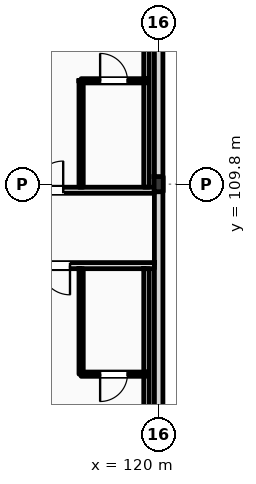
"""IFC4 building model, lengths in metres.
Left out: names, types, materials, properties, quantities, classifications, styles, units other than length and angle.
Written with IfcOpenShell. Run it as: python <this file> out.ifc"""

import sys

from ifc_helpers import new_model, si_unit, direction, frame, frame_2d, origin, origin_2d, place, context, subcontext, project, spatial, rectangle, i_section, extrude, element, fill, save


model = new_model("IFC4")
c1 = context("Model", 3, precision=1e-05, world=origin(), true_north=direction((0.0, 1.0)))
c2 = subcontext(c1, "Body", "Model", "MODEL_VIEW")
j1 = project(units=[si_unit("LENGTHUNIT", "METRE"), si_unit("PLANEANGLEUNIT", "RADIAN")], contexts=[c1])
p1 = place(None, origin())
s1 = spatial("IfcSite", under=j1, at=p1, CompositionType="ELEMENT")
p2 = place(p1, origin())
s2 = spatial("IfcBuilding", under=s1, at=p2, CompositionType="ELEMENT")
p3 = place(p2, frame((0.0, 0.0, 24.6)))
s3 = spatial("IfcBuildingStorey", under=s2, at=p3, CompositionType="ELEMENT", Elevation=24.6)
p4 = place(p3, frame((120.0, 109.8, 0.0), z_axis=(0.0, 0.0, 1.0), x_axis=(1.0, 0.0, 0.0)))
e1 = element("IfcColumn", 1, at=p4, inside=s3, PredefinedType="COLUMN", context=c2, shape_type="SweptSolid", body=[
    extrude(i_section(OverallWidth=0.3, OverallDepth=0.5, WebThickness=0.014, FlangeThickness=0.028, FilletRadius=0.027, at=origin_2d()), origin(), (0.0, 0.0, 1.0), 3.6),
])
p5 = place(p3, frame((120.0, 96.0, 0.0), z_axis=(0.0, 0.0, 1.0), x_axis=(0.0, 1.0, 0.0)))
e2 = element("IfcWall", 2, at=p5, inside=s3, PredefinedType="STANDARD", context=c2, shape_type="SweptSolid", body=[
    extrude(rectangle(XDim=22.0, YDim=0.28, at=frame_2d((11.0, 0.0))), origin(), (0.0, 0.0, 1.0), 2.93),
])
p6 = place(p3, frame((10.65, 109.6, 0.0), z_axis=(0.0, 0.0, 1.0), x_axis=(1.0, 0.0, 0.0)))
e3 = element("IfcWall", 3, at=p6, inside=s3, PredefinedType="PARTITIONING", context=c2, shape_type="SweptSolid", body=[
    extrude(rectangle(XDim=109.21, YDim=0.2, at=frame_2d((54.605, 0.0))), origin(), (0.0, 0.0, 1.0), 2.78),
])
p7 = place(p6, frame((12.705, 0.0, 0.0)))
e4 = element("IfcOpeningElement", 4, at=p7, cuts=e3, PredefinedType="OPENING", context=c2, shape_type="SweptSolid", body=[
    extrude(rectangle(XDim=1.02, YDim=2.2, at=frame_2d((0.51, 1.1))), frame((0.0, 0.11, 0.0), z_axis=(0.0, -1.0, 0.0), x_axis=(1.0, 0.0, 0.0)), (0.0, 0.0, 1.0), 0.22),
])
p8 = place(p6, frame((19.26, 0.0, 0.0)))
e5 = element("IfcOpeningElement", 5, at=p8, cuts=e3, PredefinedType="OPENING", context=c2, shape_type="SweptSolid", body=[
    extrude(rectangle(XDim=1.02, YDim=2.2, at=frame_2d((0.51, 1.1))), frame((0.0, 0.11, 0.0), z_axis=(0.0, -1.0, 0.0), x_axis=(1.0, 0.0, 0.0)), (0.0, 0.0, 1.0), 0.22),
])
p9 = place(p6, frame((23.71, 0.0, 0.0)))
e6 = element("IfcOpeningElement", 6, at=p9, cuts=e3, PredefinedType="OPENING", context=c2, shape_type="SweptSolid", body=[
    extrude(rectangle(XDim=1.02, YDim=2.2, at=frame_2d((0.51, 1.1))), frame((0.0, 0.11, 0.0), z_axis=(0.0, -1.0, 0.0), x_axis=(1.0, 0.0, 0.0)), (0.0, 0.0, 1.0), 0.22),
])
p10 = place(p6, frame((27.66, 0.0, 0.0)))
e7 = element("IfcOpeningElement", 7, at=p10, cuts=e3, PredefinedType="OPENING", context=c2, shape_type="SweptSolid", body=[
    extrude(rectangle(XDim=1.02, YDim=2.2, at=frame_2d((0.51, 1.1))), frame((0.0, 0.11, 0.0), z_axis=(0.0, -1.0, 0.0), x_axis=(1.0, 0.0, 0.0)), (0.0, 0.0, 1.0), 0.22),
])
p11 = place(p6, frame((31.89, 0.0, 0.0)))
e8 = element("IfcOpeningElement", 8, at=p11, cuts=e3, PredefinedType="OPENING", context=c2, shape_type="SweptSolid", body=[
    extrude(rectangle(XDim=0.96, YDim=2.2, at=frame_2d((0.48, 1.1))), frame((0.0, 0.11, 0.0), z_axis=(0.0, -1.0, 0.0), x_axis=(1.0, 0.0, 0.0)), (0.0, 0.0, 1.0), 0.22),
])
p12 = place(p6, frame((33.94, 0.0, 0.0)))
e9 = element("IfcOpeningElement", 9, at=p12, cuts=e3, PredefinedType="OPENING", context=c2, shape_type="SweptSolid", body=[
    extrude(rectangle(XDim=0.96, YDim=2.2, at=frame_2d((0.48, 1.1))), frame((0.0, 0.11, 0.0), z_axis=(0.0, -1.0, 0.0), x_axis=(1.0, 0.0, 0.0)), (0.0, 0.0, 1.0), 0.22),
])
p13 = place(p6, frame((40.29, 0.0, 0.0)))
e10 = element("IfcOpeningElement", 10, at=p13, cuts=e3, PredefinedType="OPENING", context=c2, shape_type="SweptSolid", body=[
    extrude(rectangle(XDim=0.96, YDim=2.2, at=frame_2d((0.48, 1.1))), frame((0.0, 0.11, 0.0), z_axis=(0.0, -1.0, 0.0), x_axis=(1.0, 0.0, 0.0)), (0.0, 0.0, 1.0), 0.22),
])
p14 = place(p6, frame((42.34, 0.0, 0.0)))
e11 = element("IfcOpeningElement", 11, at=p14, cuts=e3, PredefinedType="OPENING", context=c2, shape_type="SweptSolid", body=[
    extrude(rectangle(XDim=0.96, YDim=2.2, at=frame_2d((0.48, 1.1))), frame((0.0, 0.11, 0.0), z_axis=(0.0, -1.0, 0.0), x_axis=(1.0, 0.0, 0.0)), (0.0, 0.0, 1.0), 0.22),
])
p15 = place(p6, frame((48.69, 0.0, 0.0)))
e12 = element("IfcOpeningElement", 12, at=p15, cuts=e3, PredefinedType="OPENING", context=c2, shape_type="SweptSolid", body=[
    extrude(rectangle(XDim=0.96, YDim=2.2, at=frame_2d((0.48, 1.1))), frame((0.0, 0.11, 0.0), z_axis=(0.0, -1.0, 0.0), x_axis=(1.0, 0.0, 0.0)), (0.0, 0.0, 1.0), 0.22),
])
p16 = place(p6, frame((50.74, 0.0, 0.0)))
e13 = element("IfcOpeningElement", 13, at=p16, cuts=e3, PredefinedType="OPENING", context=c2, shape_type="SweptSolid", body=[
    extrude(rectangle(XDim=0.96, YDim=2.2, at=frame_2d((0.48, 1.1))), frame((0.0, 0.11, 0.0), z_axis=(0.0, -1.0, 0.0), x_axis=(1.0, 0.0, 0.0)), (0.0, 0.0, 1.0), 0.22),
])
p17 = place(p6, frame((57.09, 0.0, 0.0)))
e14 = element("IfcOpeningElement", 14, at=p17, cuts=e3, PredefinedType="OPENING", context=c2, shape_type="SweptSolid", body=[
    extrude(rectangle(XDim=0.96, YDim=2.2, at=frame_2d((0.48, 1.1))), frame((0.0, 0.11, 0.0), z_axis=(0.0, -1.0, 0.0), x_axis=(1.0, 0.0, 0.0)), (0.0, 0.0, 1.0), 0.22),
])
p18 = place(p6, frame((59.14, 0.0, 0.0)))
e15 = element("IfcOpeningElement", 15, at=p18, cuts=e3, PredefinedType="OPENING", context=c2, shape_type="SweptSolid", body=[
    extrude(rectangle(XDim=0.96, YDim=2.2, at=frame_2d((0.48, 1.1))), frame((0.0, 0.11, 0.0), z_axis=(0.0, -1.0, 0.0), x_axis=(1.0, 0.0, 0.0)), (0.0, 0.0, 1.0), 0.22),
])
p19 = place(p6, frame((65.49, 0.0, 0.0)))
e16 = element("IfcOpeningElement", 16, at=p19, cuts=e3, PredefinedType="OPENING", context=c2, shape_type="SweptSolid", body=[
    extrude(rectangle(XDim=0.96, YDim=2.2, at=frame_2d((0.48, 1.1))), frame((0.0, 0.11, 0.0), z_axis=(0.0, -1.0, 0.0), x_axis=(1.0, 0.0, 0.0)), (0.0, 0.0, 1.0), 0.22),
])
p20 = place(p6, frame((67.54, 0.0, 0.0)))
e17 = element("IfcOpeningElement", 17, at=p20, cuts=e3, PredefinedType="OPENING", context=c2, shape_type="SweptSolid", body=[
    extrude(rectangle(XDim=0.96, YDim=2.2, at=frame_2d((0.48, 1.1))), frame((0.0, 0.11, 0.0), z_axis=(0.0, -1.0, 0.0), x_axis=(1.0, 0.0, 0.0)), (0.0, 0.0, 1.0), 0.22),
])
p21 = place(p6, frame((73.89, 0.0, 0.0)))
e18 = element("IfcOpeningElement", 18, at=p21, cuts=e3, PredefinedType="OPENING", context=c2, shape_type="SweptSolid", body=[
    extrude(rectangle(XDim=0.96, YDim=2.2, at=frame_2d((0.48, 1.1))), frame((0.0, 0.11, 0.0), z_axis=(0.0, -1.0, 0.0), x_axis=(1.0, 0.0, 0.0)), (0.0, 0.0, 1.0), 0.22),
])
p22 = place(p6, frame((78.09, 0.0, 0.0)))
e19 = element("IfcOpeningElement", 19, at=p22, cuts=e3, PredefinedType="OPENING", context=c2, shape_type="SweptSolid", body=[
    extrude(rectangle(XDim=0.96, YDim=2.2, at=frame_2d((0.48, 1.1))), frame((0.0, 0.11, 0.0), z_axis=(0.0, -1.0, 0.0), x_axis=(1.0, 0.0, 0.0)), (0.0, 0.0, 1.0), 0.22),
])
p23 = place(p6, frame((82.29, 0.0, 0.0)))
e20 = element("IfcOpeningElement", 20, at=p23, cuts=e3, PredefinedType="OPENING", context=c2, shape_type="SweptSolid", body=[
    extrude(rectangle(XDim=0.96, YDim=2.2, at=frame_2d((0.48, 1.1))), frame((0.0, 0.11, 0.0), z_axis=(0.0, -1.0, 0.0), x_axis=(1.0, 0.0, 0.0)), (0.0, 0.0, 1.0), 0.22),
])
p24 = place(p6, frame((86.49, 0.0, 0.0)))
e21 = element("IfcOpeningElement", 21, at=p24, cuts=e3, PredefinedType="OPENING", context=c2, shape_type="SweptSolid", body=[
    extrude(rectangle(XDim=0.96, YDim=2.2, at=frame_2d((0.48, 1.1))), frame((0.0, 0.11, 0.0), z_axis=(0.0, -1.0, 0.0), x_axis=(1.0, 0.0, 0.0)), (0.0, 0.0, 1.0), 0.22),
])
p25 = place(p6, frame((88.54, 0.0, 0.0)))
e22 = element("IfcOpeningElement", 22, at=p25, cuts=e3, PredefinedType="OPENING", context=c2, shape_type="SweptSolid", body=[
    extrude(rectangle(XDim=0.96, YDim=2.2, at=frame_2d((0.48, 1.1))), frame((0.0, 0.11, 0.0), z_axis=(0.0, -1.0, 0.0), x_axis=(1.0, 0.0, 0.0)), (0.0, 0.0, 1.0), 0.22),
])
p26 = place(p6, frame((94.89, 0.0, 0.0)))
e23 = element("IfcOpeningElement", 23, at=p26, cuts=e3, PredefinedType="OPENING", context=c2, shape_type="SweptSolid", body=[
    extrude(rectangle(XDim=0.96, YDim=2.2, at=frame_2d((0.48, 1.1))), frame((0.0, 0.11, 0.0), z_axis=(0.0, -1.0, 0.0), x_axis=(1.0, 0.0, 0.0)), (0.0, 0.0, 1.0), 0.22),
])
p27 = place(p6, frame((96.94, 0.0, 0.0)))
e24 = element("IfcOpeningElement", 24, at=p27, cuts=e3, PredefinedType="OPENING", context=c2, shape_type="SweptSolid", body=[
    extrude(rectangle(XDim=0.96, YDim=2.2, at=frame_2d((0.48, 1.1))), frame((0.0, 0.11, 0.0), z_axis=(0.0, -1.0, 0.0), x_axis=(1.0, 0.0, 0.0)), (0.0, 0.0, 1.0), 0.22),
])
p28 = place(p6, frame((103.29, 0.0, 0.0)))
e25 = element("IfcOpeningElement", 25, at=p28, cuts=e3, PredefinedType="OPENING", context=c2, shape_type="SweptSolid", body=[
    extrude(rectangle(XDim=0.96, YDim=2.2, at=frame_2d((0.48, 1.1))), frame((0.0, 0.11, 0.0), z_axis=(0.0, -1.0, 0.0), x_axis=(1.0, 0.0, 0.0)), (0.0, 0.0, 1.0), 0.22),
])
p29 = place(p6, frame((105.25, 0.0, 0.0)))
e26 = element("IfcOpeningElement", 26, at=p29, cuts=e3, PredefinedType="OPENING", context=c2, shape_type="SweptSolid", body=[
    extrude(rectangle(XDim=0.96, YDim=2.2, at=frame_2d((0.48, 1.1))), frame((0.0, 0.11, 0.0), z_axis=(0.0, -1.0, 0.0), x_axis=(1.0, 0.0, 0.0)), (0.0, 0.0, 1.0), 0.22),
])
p30 = place(p6, frame((2.716, 0.0, 0.0)))
e27 = element("IfcOpeningElement", 27, at=p30, cuts=e3, PredefinedType="OPENING", context=c2, shape_type="SweptSolid", body=[
    extrude(rectangle(XDim=1.35, YDim=2.25, at=frame_2d((0.675, 1.125))), frame((0.0, 0.11, 0.0), z_axis=(0.0, -1.0, 0.0), x_axis=(1.0, 0.0, 0.0)), (0.0, 0.0, 1.0), 0.22),
])
p31 = place(p6, frame((6.65, 0.0, 0.0)))
e28 = element("IfcOpeningElement", 28, at=p31, cuts=e3, PredefinedType="OPENING", context=c2, shape_type="SweptSolid", body=[
    extrude(rectangle(XDim=1.35, YDim=2.25, at=frame_2d((0.675, 1.125))), frame((0.0, 0.11, 0.0), z_axis=(0.0, -1.0, 0.0), x_axis=(1.0, 0.0, 0.0)), (0.0, 0.0, 1.0), 0.22),
])
p32 = place(p6, frame((10.583, 0.0, 0.0)))
e29 = element("IfcOpeningElement", 29, at=p32, cuts=e3, PredefinedType="OPENING", context=c2, shape_type="SweptSolid", body=[
    extrude(rectangle(XDim=1.35, YDim=2.25, at=frame_2d((0.675, 1.125))), frame((0.0, 0.11, 0.0), z_axis=(0.0, -1.0, 0.0), x_axis=(1.0, 0.0, 0.0)), (0.0, 0.0, 1.0), 0.22),
])
p33 = place(p3, frame((79.76, 107.12, 0.0), z_axis=(0.0, 0.0, 1.0), x_axis=(1.0, 0.0, 0.0)))
e30 = element("IfcWall", 30, at=p33, inside=s3, PredefinedType="PARTITIONING", context=c2, shape_type="SweptSolid", body=[
    extrude(rectangle(XDim=40.1, YDim=0.2, at=frame_2d((20.05, 0.0))), origin(), (0.0, 0.0, 1.0), 3.34),
])
p34 = place(p33, frame((2.65, 0.0, 0.0)))
e31 = element("IfcOpeningElement", 31, at=p34, cuts=e30, PredefinedType="OPENING", context=c2, shape_type="SweptSolid", body=[
    extrude(rectangle(XDim=0.96, YDim=2.2, at=frame_2d((0.48, 1.1))), frame((0.0, 0.11, 0.0), z_axis=(0.0, -1.0, 0.0), x_axis=(1.0, 0.0, 0.0)), (0.0, 0.0, 1.0), 0.22),
])
p35 = place(p33, frame((4.448, 0.0, 0.0)))
e32 = element("IfcOpeningElement", 32, at=p35, cuts=e30, PredefinedType="OPENING", context=c2, shape_type="SweptSolid", body=[
    extrude(rectangle(XDim=0.96, YDim=2.2, at=frame_2d((0.48, 1.1))), frame((0.0, 0.11, 0.0), z_axis=(0.0, -1.0, 0.0), x_axis=(1.0, 0.0, 0.0)), (0.0, 0.0, 1.0), 0.22),
])
p36 = place(p33, frame((10.583, 0.0, 0.0)))
e33 = element("IfcOpeningElement", 33, at=p36, cuts=e30, PredefinedType="OPENING", context=c2, shape_type="SweptSolid", body=[
    extrude(rectangle(XDim=0.96, YDim=2.2, at=frame_2d((0.48, 1.1))), frame((0.0, 0.11, 0.0), z_axis=(0.0, -1.0, 0.0), x_axis=(1.0, 0.0, 0.0)), (0.0, 0.0, 1.0), 0.22),
])
p37 = place(p33, frame((12.418, 0.0, 0.0)))
e34 = element("IfcOpeningElement", 34, at=p37, cuts=e30, PredefinedType="OPENING", context=c2, shape_type="SweptSolid", body=[
    extrude(rectangle(XDim=0.96, YDim=2.2, at=frame_2d((0.48, 1.1))), frame((0.0, 0.11, 0.0), z_axis=(0.0, -1.0, 0.0), x_axis=(1.0, 0.0, 0.0)), (0.0, 0.0, 1.0), 0.22),
])
p38 = place(p33, frame((18.553, 0.0, 0.0)))
e35 = element("IfcOpeningElement", 35, at=p38, cuts=e30, PredefinedType="OPENING", context=c2, shape_type="SweptSolid", body=[
    extrude(rectangle(XDim=0.96, YDim=2.2, at=frame_2d((0.48, 1.1))), frame((0.0, 0.11, 0.0), z_axis=(0.0, -1.0, 0.0), x_axis=(1.0, 0.0, 0.0)), (0.0, 0.0, 1.0), 0.22),
])
p39 = place(p33, frame((20.388, 0.0, 0.0)))
e36 = element("IfcOpeningElement", 36, at=p39, cuts=e30, PredefinedType="OPENING", context=c2, shape_type="SweptSolid", body=[
    extrude(rectangle(XDim=0.96, YDim=2.2, at=frame_2d((0.48, 1.1))), frame((0.0, 0.11, 0.0), z_axis=(0.0, -1.0, 0.0), x_axis=(1.0, 0.0, 0.0)), (0.0, 0.0, 1.0), 0.22),
])
p40 = place(p33, frame((26.523, 0.0, 0.0)))
e37 = element("IfcOpeningElement", 37, at=p40, cuts=e30, PredefinedType="OPENING", context=c2, shape_type="SweptSolid", body=[
    extrude(rectangle(XDim=0.96, YDim=2.2, at=frame_2d((0.48, 1.1))), frame((0.0, 0.11, 0.0), z_axis=(0.0, -1.0, 0.0), x_axis=(1.0, 0.0, 0.0)), (0.0, 0.0, 1.0), 0.22),
])
p41 = place(p33, frame((28.358, 0.0, 0.0)))
e38 = element("IfcOpeningElement", 38, at=p41, cuts=e30, PredefinedType="OPENING", context=c2, shape_type="SweptSolid", body=[
    extrude(rectangle(XDim=0.96, YDim=2.2, at=frame_2d((0.48, 1.1))), frame((0.0, 0.11, 0.0), z_axis=(0.0, -1.0, 0.0), x_axis=(1.0, 0.0, 0.0)), (0.0, 0.0, 1.0), 0.22),
])
p42 = place(p33, frame((34.493, 0.0, 0.0)))
e39 = element("IfcOpeningElement", 39, at=p42, cuts=e30, PredefinedType="OPENING", context=c2, shape_type="SweptSolid", body=[
    extrude(rectangle(XDim=0.96, YDim=2.2, at=frame_2d((0.48, 1.1))), frame((0.0, 0.11, 0.0), z_axis=(0.0, -1.0, 0.0), x_axis=(1.0, 0.0, 0.0)), (0.0, 0.0, 1.0), 0.22),
])
p43 = place(p33, frame((36.364, 0.0, 0.0)))
e40 = element("IfcOpeningElement", 40, at=p43, cuts=e30, PredefinedType="OPENING", context=c2, shape_type="SweptSolid", body=[
    extrude(rectangle(XDim=0.96, YDim=2.2, at=frame_2d((0.48, 1.1))), frame((0.0, 0.11, 0.0), z_axis=(0.0, -1.0, 0.0), x_axis=(1.0, 0.0, 0.0)), (0.0, 0.0, 1.0), 0.22),
])
p44 = place(p3, frame((119.6, 109.7, 0.0), z_axis=(0.0, 0.0, 1.0), x_axis=(0.0, 1.0, 0.0)))
e41 = element("IfcWall", 41, at=p44, inside=s3, PredefinedType="PARTITIONING", context=c2, shape_type="SweptSolid", body=[
    extrude(rectangle(XDim=8.15, YDim=0.18, at=frame_2d((4.075, 0.0))), origin(), (0.0, 0.0, 1.0), 3.34),
])
p45 = place(p3, frame((117.45, 109.7, 0.0), z_axis=(0.0, 0.0, 1.0), x_axis=(0.0, 1.0, 0.0)))
e42 = element("IfcWall", 42, at=p45, inside=s3, PredefinedType="PARTITIONING", context=c2, shape_type="SweptSolid", body=[
    extrude(rectangle(XDim=3.5, YDim=0.14, at=frame_2d((1.75, 0.0))), origin(), (0.0, 0.0, 1.0), 3.34),
])
p46 = place(p3, frame((117.45, 113.2, 0.0), z_axis=(0.0, 0.0, 1.0), x_axis=(1.0, 0.0, 0.0)))
e43 = element("IfcWall", 43, at=p46, inside=s3, PredefinedType="PARTITIONING", context=c2, shape_type="SweptSolid", body=[
    extrude(rectangle(XDim=2.15, YDim=0.14, at=frame_2d((1.075, 0.0))), origin(), (0.0, 0.0, 1.0), 3.34),
])
p47 = place(p46, frame((0.625, 0.0, 0.0)))
e44 = element("IfcOpeningElement", 44, at=p47, cuts=e43, PredefinedType="OPENING", context=c2, shape_type="SweptSolid", body=[
    extrude(rectangle(XDim=0.9, YDim=2.1, at=frame_2d((0.45, 1.05))), frame((0.0, 0.08, 0.0), z_axis=(0.0, -1.0, 0.0), x_axis=(1.0, 0.0, 0.0)), (0.0, 0.0, 1.0), 0.16),
])
p48 = place(p3, frame((119.6, 96.14, 0.0), z_axis=(0.0, 0.0, 1.0), x_axis=(0.0, 1.0, 0.0)))
e45 = element("IfcWall", 45, at=p48, inside=s3, PredefinedType="PARTITIONING", context=c2, shape_type="SweptSolid", body=[
    extrude(rectangle(XDim=10.88, YDim=0.18, at=frame_2d((5.44, 0.0))), origin(), (0.0, 0.0, 1.0), 3.34),
])
p49 = place(p3, frame((117.45, 103.55, 0.0), z_axis=(0.0, 0.0, 1.0), x_axis=(0.0, 1.0, 0.0)))
e46 = element("IfcWall", 46, at=p49, inside=s3, PredefinedType="PARTITIONING", context=c2, shape_type="SweptSolid", body=[
    extrude(rectangle(XDim=3.47, YDim=0.14, at=frame_2d((1.735, 0.0))), origin(), (0.0, 0.0, 1.0), 3.34),
])
p50 = place(p3, frame((117.45, 103.55, 0.0), z_axis=(0.0, 0.0, 1.0), x_axis=(1.0, 0.0, 0.0)))
e47 = element("IfcWall", 47, at=p50, inside=s3, PredefinedType="PARTITIONING", context=c2, shape_type="SweptSolid", body=[
    extrude(rectangle(XDim=2.15, YDim=0.14, at=frame_2d((1.075, 0.0))), origin(), (0.0, 0.0, 1.0), 3.34),
])
p51 = place(p50, frame((0.625, 0.0, 0.0)))
e48 = element("IfcOpeningElement", 48, at=p51, cuts=e47, PredefinedType="OPENING", context=c2, shape_type="SweptSolid", body=[
    extrude(rectangle(XDim=0.9, YDim=2.1, at=frame_2d((0.45, 1.05))), frame((0.0, 0.08, 0.0), z_axis=(0.0, -1.0, 0.0), x_axis=(1.0, 0.0, 0.0)), (0.0, 0.0, 1.0), 0.16),
])
p52 = place(p29, origin())
e49 = element("IfcDoor", 49, at=p52, inside=s3, OperationType="SINGLE_SWING_RIGHT", PredefinedType="DOOR", context=c2, shape_type="SweptSolid", body=[
    extrude(rectangle(XDim=0.96, YDim=2.2, at=frame_2d((0.48, 1.1))), frame((0.0, 0.025, 0.0), z_axis=(0.0, -1.0, 0.0), x_axis=(1.0, 0.0, 0.0)), (0.0, 0.0, 1.0), 0.05),
])
fill(e26, e49)
p53 = place(p47, origin())
e50 = element("IfcDoor", 50, at=p53, inside=s3, OperationType="SINGLE_SWING_LEFT", PredefinedType="DOOR", context=c2, shape_type="SweptSolid", body=[
    extrude(rectangle(XDim=0.9, YDim=2.1, at=frame_2d((0.45, 1.05))), frame((0.0, 0.025, 0.0), z_axis=(0.0, -1.0, 0.0), x_axis=(1.0, 0.0, 0.0)), (0.0, 0.0, 1.0), 0.05),
])
fill(e44, e50)
p54 = place(p43, frame((0.96, 0.0, 0.0), z_axis=(0.0, 0.0, 1.0), x_axis=(-1.0, 0.0, 0.0)))
e51 = element("IfcDoor", 51, at=p54, inside=s3, OperationType="SINGLE_SWING_RIGHT", PredefinedType="DOOR", context=c2, shape_type="SweptSolid", body=[
    extrude(rectangle(XDim=0.96, YDim=2.2, at=frame_2d((0.48, 1.1))), frame((0.0, 0.025, 0.0), z_axis=(0.0, -1.0, 0.0), x_axis=(1.0, 0.0, 0.0)), (0.0, 0.0, 1.0), 0.05),
])
fill(e40, e51)
p55 = place(p51, frame((0.9, 0.0, 0.0), z_axis=(0.0, 0.0, 1.0), x_axis=(-1.0, 0.0, 0.0)))
e52 = element("IfcDoor", 52, at=p55, inside=s3, OperationType="SINGLE_SWING_LEFT", PredefinedType="DOOR", context=c2, shape_type="SweptSolid", body=[
    extrude(rectangle(XDim=0.9, YDim=2.1, at=frame_2d((0.45, 1.05))), frame((0.0, 0.025, 0.0), z_axis=(0.0, -1.0, 0.0), x_axis=(1.0, 0.0, 0.0)), (0.0, 0.0, 1.0), 0.05),
])
fill(e48, e52)
save(model, sys.argv[1])
